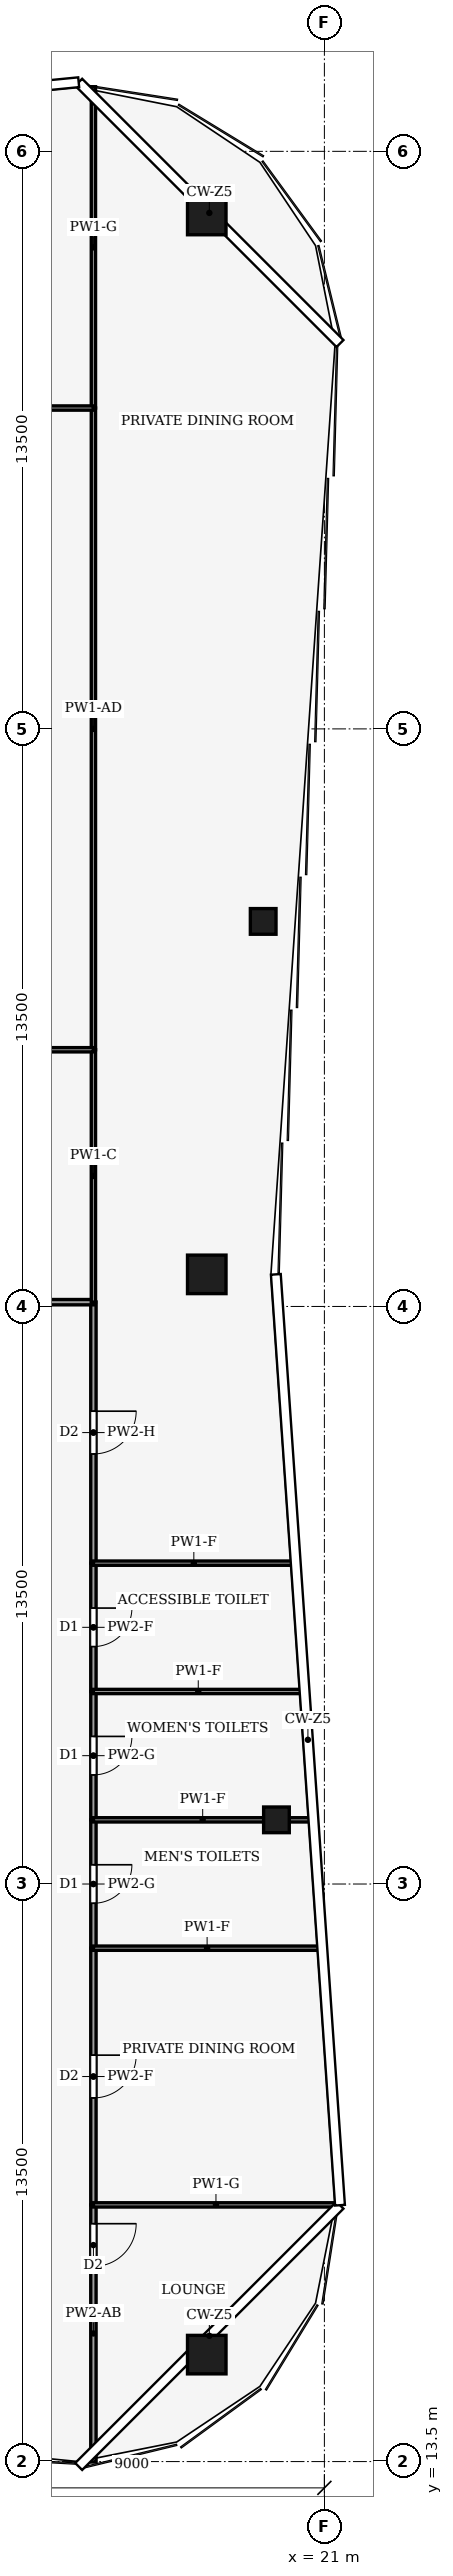
"""IFC4 building model, lengths in metres.
Left out: names, types, materials, properties, quantities, classifications, styles, units other than length and angle.
Written with IfcOpenShell. Run it as: python <this file> out.ifc"""

import sys

from ifc_helpers import new_model, si_unit, direction, frame, frame_2d, origin, origin_2d, place, context, subcontext, project, spatial, rectangle, hollow_rectangle, extrude, element, fill, save


model = new_model("IFC4")
c1 = context("Model", 3, precision=1e-05, world=origin(), true_north=direction((0.0, 1.0)))
c2 = subcontext(c1, "Body", "Model", "MODEL_VIEW")
j1 = project(units=[si_unit("LENGTHUNIT", "METRE"), si_unit("PLANEANGLEUNIT", "RADIAN")], contexts=[c1])
p1 = place(None, origin())
s1 = spatial("IfcSite", under=j1, at=p1, CompositionType="ELEMENT")
p2 = place(p1, origin())
s2 = spatial("IfcBuilding", under=s1, at=p2, CompositionType="ELEMENT")
p3 = place(p2, frame((0.0, 0.0, 326.0)))
s3 = spatial("IfcBuildingStorey", under=s2, at=p3, CompositionType="ELEMENT", Elevation=326.0)
for number, where, z_axis, x_axis in (
    (1, (18.25, 66.0, 0.0), (0.0, 0.0, 1.0), (1.0, 0.0, 0.0)),
    (2, (18.25, 41.25, 0.0), (0.0, 0.0, 1.0), (1.0, 0.0, 0.0)),
    (3, (18.25, 16.0, 0.0), (0.0, 0.0, 1.0), (1.0, 0.0, 0.0)),
):
    element("IfcColumn", number, at=place(p3, frame(where, z_axis=z_axis, x_axis=x_axis)), inside=s3, PredefinedType="COLUMN", context=c2, shape_type="SweptSolid", body=[
        extrude(hollow_rectangle(XDim=0.9, YDim=0.9, WallThickness=0.04, at=origin_2d()), origin(), (0.0, 0.0, 1.0), 4.0),
    ])
for number, where, z_axis, x_axis in (
    (4, (19.879, 28.5, 0.0), (0.0, 0.0, 1.0), (1.0, 0.0, 0.0)),
    (5, (19.569, 49.5, 0.0), (0.0, 0.0, 1.0), (1.0, 0.0, 0.0)),
):
    element("IfcColumn", number, at=place(p3, frame(where, z_axis=z_axis, x_axis=x_axis)), inside=s3, PredefinedType="COLUMN", context=c2, shape_type="SweptSolid", body=[
        extrude(hollow_rectangle(XDim=0.6, YDim=0.6, WallThickness=0.025, at=origin_2d()), origin(), (0.0, 0.0, 1.0), 4.0),
    ])
p4 = place(p3, frame((15.6, 19.5, 0.0), z_axis=(0.0, 0.0, 1.0), x_axis=(0.0, -1.0, 0.0)))
e6 = element("IfcWall", 6, at=p4, inside=s3, PredefinedType="PARTITIONING", context=c2, shape_type="SweptSolid", body=[
    extrude(rectangle(XDim=6.01, YDim=0.125, at=frame_2d((3.005, 0.0))), origin(), (0.0, 0.0, 1.0), 2.93),
])
p5 = place(p4, frame((0.44, 0.0, 0.0)))
e7 = element("IfcOpeningElement", 7, at=p5, cuts=e6, PredefinedType="OPENING", context=c2, shape_type="SweptSolid", body=[
    extrude(rectangle(XDim=1.0, YDim=2.1, at=frame_2d((0.5, 1.05))), frame((0.0, 0.073, 0.0), z_axis=(0.0, -1.0, 0.0), x_axis=(1.0, 0.0, 0.0)), (0.0, 0.0, 1.0), 0.145),
])
p6 = place(p3, frame((15.6, 25.5, 0.0), z_axis=(0.0, 0.0, 1.0), x_axis=(0.0, -1.0, 0.0)))
e8 = element("IfcWall", 8, at=p6, inside=s3, PredefinedType="PARTITIONING", context=c2, shape_type="SweptSolid", body=[
    extrude(rectangle(XDim=6.0, YDim=0.125, at=frame_2d((3.0, 0.0))), origin(), (0.0, 0.0, 1.0), 3.54),
])
p7 = place(p6, frame((2.5, 0.0, 0.0)))
e9 = element("IfcOpeningElement", 9, at=p7, cuts=e8, PredefinedType="OPENING", context=c2, shape_type="SweptSolid", body=[
    extrude(rectangle(XDim=1.0, YDim=2.1, at=frame_2d((0.5, 1.05))), frame((0.0, 0.073, 0.0), z_axis=(0.0, -1.0, 0.0), x_axis=(1.0, 0.0, 0.0)), (0.0, 0.0, 1.0), 0.145),
])
p8 = place(p3, frame((15.6, 28.5, 0.0), z_axis=(0.0, 0.0, 1.0), x_axis=(0.0, -1.0, 0.0)))
e10 = element("IfcWall", 10, at=p8, inside=s3, PredefinedType="PARTITIONING", context=c2, shape_type="SweptSolid", body=[
    extrude(rectangle(XDim=3.0, YDim=0.125, at=frame_2d((1.5, 0.0))), origin(), (0.0, 0.0, 1.0), 3.87),
])
p9 = place(p8, frame((1.05, 0.0, 0.0)))
e11 = element("IfcOpeningElement", 11, at=p9, cuts=e10, PredefinedType="OPENING", context=c2, shape_type="SweptSolid", body=[
    extrude(rectangle(XDim=0.9, YDim=2.1, at=frame_2d((0.45, 1.05))), frame((0.0, 0.073, 0.0), z_axis=(0.0, -1.0, 0.0), x_axis=(1.0, 0.0, 0.0)), (0.0, 0.0, 1.0), 0.145),
])
p10 = place(p3, frame((15.6, 31.5, 0.0), z_axis=(0.0, 0.0, 1.0), x_axis=(0.0, -1.0, 0.0)))
e12 = element("IfcWall", 12, at=p10, inside=s3, PredefinedType="PARTITIONING", context=c2, shape_type="SweptSolid", body=[
    extrude(rectangle(XDim=3.0, YDim=0.125, at=frame_2d((1.5, 0.0))), origin(), (0.0, 0.0, 1.0), 3.87),
])
p11 = place(p10, frame((1.05, 0.0, 0.0)))
e13 = element("IfcOpeningElement", 13, at=p11, cuts=e12, PredefinedType="OPENING", context=c2, shape_type="SweptSolid", body=[
    extrude(rectangle(XDim=0.9, YDim=2.1, at=frame_2d((0.45, 1.05))), frame((0.0, 0.073, 0.0), z_axis=(0.0, -1.0, 0.0), x_axis=(1.0, 0.0, 0.0)), (0.0, 0.0, 1.0), 0.145),
])
p12 = place(p3, frame((15.6, 34.5, 0.0), z_axis=(0.0, 0.0, 1.0), x_axis=(0.0, -1.0, 0.0)))
e14 = element("IfcWall", 14, at=p12, inside=s3, PredefinedType="PARTITIONING", context=c2, shape_type="SweptSolid", body=[
    extrude(rectangle(XDim=3.0, YDim=0.125, at=frame_2d((1.5, 0.0))), origin(), (0.0, 0.0, 1.0), 3.54),
])
p13 = place(p12, frame((1.05, 0.0, 0.0)))
e15 = element("IfcOpeningElement", 15, at=p13, cuts=e14, PredefinedType="OPENING", context=c2, shape_type="SweptSolid", body=[
    extrude(rectangle(XDim=0.9, YDim=2.1, at=frame_2d((0.45, 1.05))), frame((0.0, 0.073, 0.0), z_axis=(0.0, -1.0, 0.0), x_axis=(1.0, 0.0, 0.0)), (0.0, 0.0, 1.0), 0.145),
])
p14 = place(p3, frame((15.6, 40.604, 0.0), z_axis=(0.0, 0.0, 1.0), x_axis=(0.0, -1.0, 0.0)))
e16 = element("IfcWall", 16, at=p14, inside=s3, PredefinedType="PARTITIONING", context=c2, shape_type="SweptSolid", body=[
    extrude(rectangle(XDim=6.104, YDim=0.125, at=frame_2d((3.052, 0.0))), origin(), (0.0, 0.0, 1.0), 3.14),
])
p15 = place(p14, frame((2.552, 0.0, 0.0)))
e17 = element("IfcOpeningElement", 17, at=p15, cuts=e16, PredefinedType="OPENING", context=c2, shape_type="SweptSolid", body=[
    extrude(rectangle(XDim=1.0, YDim=2.1, at=frame_2d((0.5, 1.05))), frame((0.0, 0.073, 0.0), z_axis=(0.0, -1.0, 0.0), x_axis=(1.0, 0.0, 0.0)), (0.0, 0.0, 1.0), 0.145),
])
p16 = place(p3, frame((9.0, 40.6, 0.0), z_axis=(0.0, 0.0, 1.0), x_axis=(1.0, 0.0, 0.0)))
e18 = element("IfcWall", 18, at=p16, inside=s3, PredefinedType="PARTITIONING", context=c2, shape_type="SweptSolid", body=[
    extrude(rectangle(XDim=6.6, YDim=0.125, at=frame_2d((3.3, 0.0))), origin(), (0.0, 0.0, 1.0), 3.39),
])
p17 = place(p16, frame((2.8, 0.0, 0.0)))
e19 = element("IfcOpeningElement", 19, at=p17, cuts=e18, PredefinedType="OPENING", context=c2, shape_type="SweptSolid", body=[
    extrude(rectangle(XDim=1.0, YDim=2.1, at=frame_2d((0.5, 1.05))), frame((0.0, 0.073, 0.0), z_axis=(0.0, -1.0, 0.0), x_axis=(1.0, 0.0, 0.0)), (0.0, 0.0, 1.0), 0.145),
])
p18 = place(p3, frame((21.33, 19.5, 0.0), z_axis=(0.0, 0.0, 1.0), x_axis=(-1.0, 0.0, 0.0)))
e20 = element("IfcWall", 20, at=p18, inside=s3, PredefinedType="PARTITIONING", context=c2, shape_type="SweptSolid", body=[
    extrude(rectangle(XDim=5.73, YDim=0.1, at=frame_2d((2.865, 0.0))), origin(), (0.0, 0.0, 1.0), 2.93),
])
p19 = place(p3, frame((20.916, 25.5, 0.0), z_axis=(0.0, 0.0, 1.0), x_axis=(-1.0, 0.0, 0.0)))
e21 = element("IfcWall", 21, at=p19, inside=s3, PredefinedType="PARTITIONING", context=c2, shape_type="SweptSolid", body=[
    extrude(rectangle(XDim=5.316, YDim=0.1, at=frame_2d((2.658, 0.0))), origin(), (0.0, 0.0, 1.0), 3.04),
])
p20 = place(p3, frame((20.709, 28.5, 0.0), z_axis=(0.0, 0.0, 1.0), x_axis=(-1.0, 0.0, 0.0)))
e22 = element("IfcWall", 22, at=p20, inside=s3, PredefinedType="PARTITIONING", context=c2, shape_type="SweptSolid", body=[
    extrude(rectangle(XDim=5.109, YDim=0.1, at=frame_2d((2.555, 0.0))), origin(), (0.0, 0.0, 1.0), 3.04),
])
p21 = place(p3, frame((20.502, 31.5, 0.0), z_axis=(0.0, 0.0, 1.0), x_axis=(-1.0, 0.0, 0.0)))
e23 = element("IfcWall", 23, at=p21, inside=s3, PredefinedType="PARTITIONING", context=c2, shape_type="SweptSolid", body=[
    extrude(rectangle(XDim=4.902, YDim=0.1, at=frame_2d((2.451, 0.0))), origin(), (0.0, 0.0, 1.0), 3.04),
])
p22 = place(p3, frame((20.295, 34.5, 0.0), z_axis=(0.0, 0.0, 1.0), x_axis=(-1.0, 0.0, 0.0)))
e24 = element("IfcWall", 24, at=p22, inside=s3, PredefinedType="PARTITIONING", context=c2, shape_type="SweptSolid", body=[
    extrude(rectangle(XDim=4.695, YDim=0.1, at=frame_2d((2.348, 0.0))), origin(), (0.0, 0.0, 1.0), 3.04),
])
p23 = place(p3, frame((15.6, 46.5, 0.0), z_axis=(0.0, 0.0, 1.0), x_axis=(0.0, -1.0, 0.0)))
e25 = element("IfcWall", 25, at=p23, inside=s3, PredefinedType="PARTITIONING", context=c2, shape_type="SweptSolid", body=[
    extrude(rectangle(XDim=5.9, YDim=0.1, at=frame_2d((2.95, 0.0))), origin(), (0.0, 0.0, 1.0), 3.87),
])
p24 = place(p3, frame((15.6, 61.5, 0.0), z_axis=(0.0, 0.0, 1.0), x_axis=(0.0, -1.0, 0.0)))
e26 = element("IfcWall", 26, at=p24, inside=s3, PredefinedType="PARTITIONING", context=c2, shape_type="SweptSolid", body=[
    extrude(rectangle(XDim=15.0, YDim=0.1, at=frame_2d((7.5, 0.0))), origin(), (0.0, 0.0, 1.0), 3.35),
])
p25 = place(p3, frame((15.6, 69.01, 0.0), z_axis=(0.0, 0.0, 1.0), x_axis=(0.0, -1.0, 0.0)))
e27 = element("IfcWall", 27, at=p25, inside=s3, PredefinedType="PARTITIONING", context=c2, shape_type="SweptSolid", body=[
    extrude(rectangle(XDim=7.51, YDim=0.1, at=frame_2d((3.755, 0.0))), origin(), (0.0, 0.0, 1.0), 2.93),
])
p26 = place(p3, frame((15.6, 46.5, 0.0), z_axis=(0.0, 0.0, 1.0), x_axis=(-1.0, 0.0, 0.0)))
e28 = element("IfcWall", 28, at=p26, inside=s3, PredefinedType="PARTITIONING", context=c2, shape_type="SweptSolid", body=[
    extrude(rectangle(XDim=6.604, YDim=0.1, at=frame_2d((3.302, 0.0))), origin(), (0.0, 0.0, 1.0), 3.39),
])
p27 = place(p3, frame((9.0, 61.5, 0.0), z_axis=(0.0, 0.0, 1.0), x_axis=(1.0, 0.0, 0.0)))
e29 = element("IfcWall", 29, at=p27, inside=s3, PredefinedType="PARTITIONING", context=c2, shape_type="SweptSolid", body=[
    extrude(rectangle(XDim=6.6, YDim=0.1, at=frame_2d((3.3, 0.0))), origin(), (0.0, 0.0, 1.0), 3.24),
])
p28 = place(p27, frame((2.8, 0.0, 0.0)))
e30 = element("IfcOpeningElement", 30, at=p28, cuts=e29, PredefinedType="OPENING", context=c2, shape_type="SweptSolid", body=[
    extrude(rectangle(XDim=1.0, YDim=2.1, at=frame_2d((0.5, 1.05))), frame((0.0, 0.06, 0.0), z_axis=(0.0, -1.0, 0.0), x_axis=(1.0, 0.0, 0.0)), (0.0, 0.0, 1.0), 0.12),
])
p29 = place(p5, origin())
e31 = element("IfcDoor", 31, at=p29, inside=s3, OperationType="SINGLE_SWING_LEFT", PredefinedType="DOOR", context=c2, shape_type="SweptSolid", body=[
    extrude(rectangle(XDim=1.0, YDim=2.1, at=frame_2d((0.5, 1.05))), frame((0.0, 0.025, 0.0), z_axis=(0.0, -1.0, 0.0), x_axis=(1.0, 0.0, 0.0)), (0.0, 0.0, 1.0), 0.05),
])
fill(e7, e31)
p30 = place(p7, origin())
e32 = element("IfcDoor", 32, at=p30, inside=s3, OperationType="SINGLE_SWING_LEFT", PredefinedType="DOOR", context=c2, shape_type="SweptSolid", body=[
    extrude(rectangle(XDim=1.0, YDim=2.1, at=frame_2d((0.5, 1.05))), frame((0.0, 0.025, 0.0), z_axis=(0.0, -1.0, 0.0), x_axis=(1.0, 0.0, 0.0)), (0.0, 0.0, 1.0), 0.05),
])
fill(e9, e32)
p31 = place(p9, origin())
e33 = element("IfcDoor", 33, at=p31, inside=s3, OperationType="SINGLE_SWING_RIGHT", PredefinedType="DOOR", context=c2, shape_type="SweptSolid", body=[
    extrude(rectangle(XDim=0.9, YDim=2.1, at=frame_2d((0.45, 1.05))), frame((0.0, 0.025, 0.0), z_axis=(0.0, -1.0, 0.0), x_axis=(1.0, 0.0, 0.0)), (0.0, 0.0, 1.0), 0.05),
])
fill(e11, e33)
p32 = place(p11, origin())
e34 = element("IfcDoor", 34, at=p32, inside=s3, OperationType="SINGLE_SWING_LEFT", PredefinedType="DOOR", context=c2, shape_type="SweptSolid", body=[
    extrude(rectangle(XDim=0.9, YDim=2.1, at=frame_2d((0.45, 1.05))), frame((0.0, 0.025, 0.0), z_axis=(0.0, -1.0, 0.0), x_axis=(1.0, 0.0, 0.0)), (0.0, 0.0, 1.0), 0.05),
])
fill(e13, e34)
p33 = place(p13, origin())
e35 = element("IfcDoor", 35, at=p33, inside=s3, OperationType="SINGLE_SWING_RIGHT", PredefinedType="DOOR", context=c2, shape_type="SweptSolid", body=[
    extrude(rectangle(XDim=0.9, YDim=2.1, at=frame_2d((0.45, 1.05))), frame((0.0, 0.025, 0.0), z_axis=(0.0, -1.0, 0.0), x_axis=(1.0, 0.0, 0.0)), (0.0, 0.0, 1.0), 0.05),
])
fill(e15, e35)
p34 = place(p15, origin())
e36 = element("IfcDoor", 36, at=p34, inside=s3, OperationType="SINGLE_SWING_LEFT", PredefinedType="DOOR", context=c2, shape_type="SweptSolid", body=[
    extrude(rectangle(XDim=1.0, YDim=2.1, at=frame_2d((0.5, 1.05))), frame((0.0, 0.025, 0.0), z_axis=(0.0, -1.0, 0.0), x_axis=(1.0, 0.0, 0.0)), (0.0, 0.0, 1.0), 0.05),
])
fill(e17, e36)
save(model, sys.argv[1])
